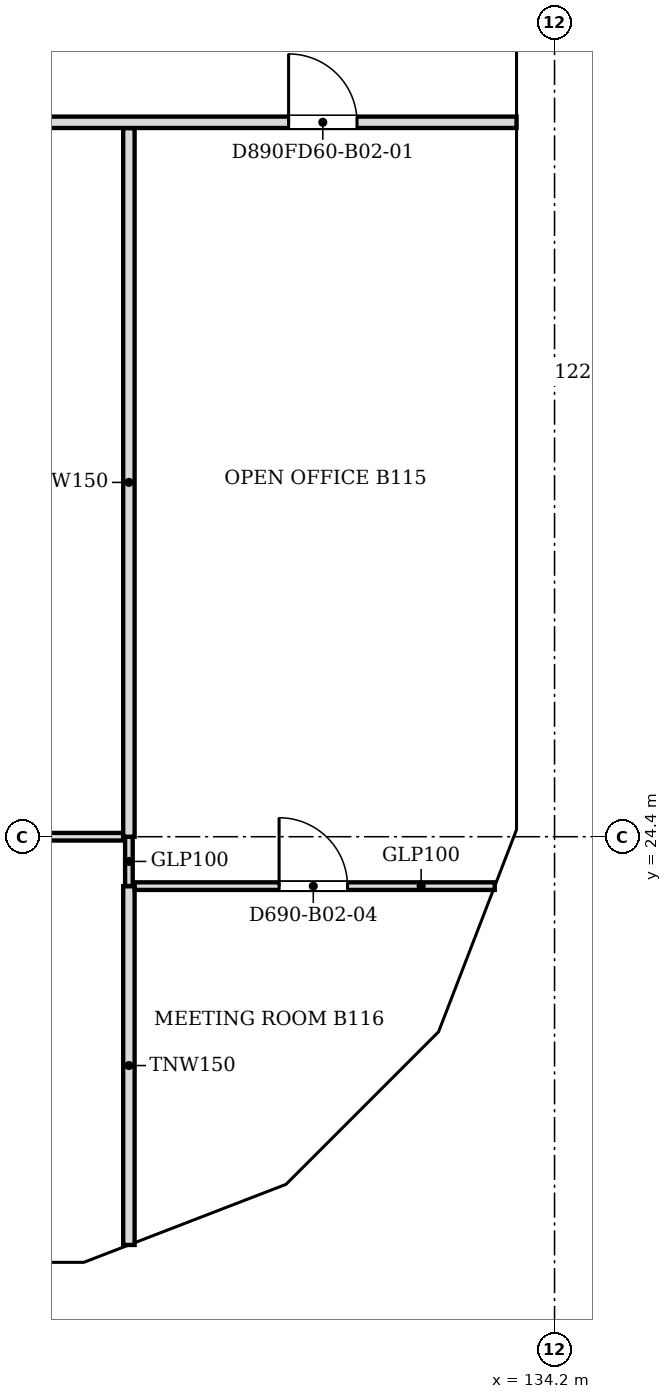
"""IFC4 building model, lengths in metres.
Left out: names, types, materials, properties, quantities, classifications, styles, units other than length and angle.
Written with IfcOpenShell. Run it as: python <this file> out.ifc"""

import sys

from ifc_helpers import new_model, si_unit, direction, frame, frame_2d, origin, place, context, subcontext, project, spatial, polyline, rectangle, outline, extrude, faceted_brep, source, transform, mapped, element, fill, save


model = new_model("IFC4")
c1 = context("Model", 3, precision=1e-05, world=origin(), true_north=direction((0.0, 1.0)))
c2 = subcontext(c1, "Body", "Model", "MODEL_VIEW")
j1 = project(units=[si_unit("LENGTHUNIT", "METRE"), si_unit("PLANEANGLEUNIT", "RADIAN")], contexts=[c1])
p1 = place(None, origin())
s1 = spatial("IfcSite", under=j1, at=p1, CompositionType="ELEMENT")
p2 = place(p1, origin())
s2 = spatial("IfcBuilding", under=s1, at=p2, CompositionType="ELEMENT")
p3 = place(p2, frame((0.0, 0.0, 21.3)))
s3 = spatial("IfcBuildingStorey", under=s2, at=p3, CompositionType="ELEMENT", Elevation=21.3)
m1 = source(origin(), c2, "Body", "Brep", [
    faceted_brep([(3.05, -0.25, 0.0), (6.053, -0.25, 4.5), (3.05, -0.25, 9.0), (0.0, -0.25, 4.5), (0.0, 0.25, 4.5), (3.05, 0.25, 9.0), (6.007, 0.25, 4.57), (6.007, 0.25, 4.43), (3.05, 0.25, 0.0), (6.053, 0.0, 4.5)], [[[0, 1, 2, 3]], [[4, 5, 6, 7, 8]], [[8, 7, 9, 1, 0]], [[6, 5, 2, 1, 9]], [[5, 4, 3, 2]], [[4, 8, 0, 3]], [[9, 7, 6]]]),
])
p4 = place(p3, frame((122.0, 18.55, -4.5), z_axis=(0.0, 0.0, 1.0), x_axis=(1.0, 0.0, 0.0)))
e1 = element("IfcWall", 1, at=p4, inside=s3, PredefinedType="SOLIDWALL", context=c2, shape_type="MappedRepresentation", body=[
    mapped(m1, transform((0.0, 0.0, 0.0), scale=1.0)),
])
m2 = source(origin(), c2, "Body", "SweptSolid", [
    extrude(outline(polyline([(3.048, 0.448), (5.753, 4.5), (3.048, 8.552), (0.302, 4.5), (3.048, 0.448)])), frame((0.0, 0.26, 0.0), z_axis=(0.0, -1.0, 0.0), x_axis=(1.0, 0.0, 0.0)), (0.0, 0.0, 1.0), 0.52),
])
p5 = place(p4, origin())
e2 = element("IfcOpeningElement", 2, at=p5, cuts=e1, PredefinedType="OPENING", context=c2, shape_type="MappedRepresentation", body=[
    mapped(m2, transform((0.0, 0.0, 0.0), scale=1.0)),
])
m3 = source(origin(), c2, "Body", "Brep", [
    faceted_brep([(2.95, -0.25, 0.0), (3.003, -0.25, 0.081), (3.003, -0.25, 8.919), (2.95, -0.25, 9.0), (0.0, -0.25, 4.5), (0.047, 0.25, 4.571), (2.898, 0.25, 8.919), (2.898, 0.25, 0.081), (0.047, 0.25, 4.429), (2.95, 0.0, 0.0), (2.95, 0.0, 9.0), (0.0, 0.0, 4.5)], [[[0, 1, 2, 3, 4]], [[5, 6, 7, 8]], [[1, 0, 9]], [[10, 3, 2]], [[6, 5, 11, 4, 3, 10]], [[8, 7, 9, 0, 4, 11]], [[8, 11, 5]], [[1, 9, 7, 6, 10, 2]]]),
])
p6 = place(p3, frame((128.053, 18.55, -4.5), z_axis=(0.0, 0.0, 1.0), x_axis=(0.933007896601, 0.359855894603, 0.0)))
e3 = element("IfcWall", 3, at=p6, inside=s3, PredefinedType="SOLIDWALL", context=c2, shape_type="MappedRepresentation", body=[
    mapped(m3, transform((0.0, 0.0, 0.0), scale=1.0)),
])
m4 = source(origin(), c2, "Body", "SweptSolid", [
    extrude(outline(polyline([(2.75, 8.239), (0.299, 4.5), (2.75, 0.761), (2.75, 8.239)])), frame((0.0, 0.26, 0.0), z_axis=(0.0, -1.0, 0.0), x_axis=(1.0, 0.0, 0.0)), (0.0, 0.0, 1.0), 0.52),
])
p7 = place(p6, origin())
e4 = element("IfcOpeningElement", 4, at=p7, cuts=e3, PredefinedType="OPENING", context=c2, shape_type="MappedRepresentation", body=[
    mapped(m4, transform((0.0, 0.0, 0.0), scale=1.0)),
])
m5 = source(origin(), c2, "Body", "Brep", [
    faceted_brep([(0.053, -0.25, 0.0), (2.997, -0.25, 4.5), (0.053, -0.25, 9.0), (0.0, -0.25, 8.919), (0.0, -0.25, 0.081), (0.106, 0.25, 8.919), (2.944, 0.25, 4.581), (2.944, 0.25, 4.419), (0.106, 0.25, 0.081), (2.997, 0.0, 4.5), (0.053, 0.0, 0.0), (0.053, 0.0, 9.0)], [[[0, 1, 2, 3, 4]], [[5, 6, 7, 8]], [[8, 7, 9, 1, 0, 10]], [[6, 5, 11, 2, 1, 9]], [[3, 2, 11]], [[10, 0, 4]], [[8, 10, 4, 3, 11, 5]], [[9, 7, 6]]]),
])
p8 = place(p3, frame((130.769, 19.574, -4.5), z_axis=(0.0, 0.0, 1.0), x_axis=(0.707106781187, 0.707106781187, 0.0)))
e5 = element("IfcWall", 5, at=p8, inside=s3, PredefinedType="SOLIDWALL", context=c2, shape_type="MappedRepresentation", body=[
    mapped(m5, transform((0.0, 0.0, 0.0), scale=1.0)),
])
m6 = source(origin(), c2, "Body", "SweptSolid", [
    extrude(outline(polyline([(0.253, 0.762), (2.698, 4.5), (0.253, 8.238), (0.253, 0.762)])), frame((0.0, 0.26, 0.0), z_axis=(0.0, -1.0, 0.0), x_axis=(1.0, 0.0, 0.0)), (0.0, 0.0, 1.0), 0.52),
])
p9 = place(p8, origin())
e6 = element("IfcOpeningElement", 6, at=p9, cuts=e5, PredefinedType="OPENING", context=c2, shape_type="MappedRepresentation", body=[
    mapped(m6, transform((0.0, 0.0, 0.0), scale=1.0)),
])
m7 = source(origin(), c2, "Body", "Brep", [
    faceted_brep([(2.95, -0.25, 0.0), (2.997, -0.25, 0.07), (2.997, -0.25, 8.93), (2.95, -0.25, 9.0), (0.0, -0.25, 4.5), (0.053, 0.25, 4.581), (2.904, 0.25, 8.929), (2.904, 0.25, 0.071), (0.053, 0.25, 4.419), (2.95, 0.0, 0.0), (2.95, 0.0, 9.0), (0.0, 0.0, 4.5)], [[[0, 1, 2, 3, 4]], [[5, 6, 7, 8]], [[1, 0, 9]], [[10, 3, 2]], [[6, 5, 11, 4, 3, 10]], [[8, 7, 9, 0, 4, 11]], [[8, 11, 5]], [[1, 9, 7, 6, 10, 2]]]),
])
p10 = place(p3, frame((132.888, 21.694, -4.5), z_axis=(0.0, 0.0, 1.0), x_axis=(0.359901446078, 0.932990326376, 0.0)))
e7 = element("IfcWall", 7, at=p10, inside=s3, PredefinedType="SOLIDWALL", context=c2, shape_type="MappedRepresentation", body=[
    mapped(m7, transform((0.0, 0.0, 0.0), scale=1.0)),
])
p11 = place(p10, origin())
e8 = element("IfcOpeningElement", 8, at=p11, cuts=e7, PredefinedType="OPENING", context=c2, shape_type="MappedRepresentation", body=[
    mapped(m4, transform((0.0, 0.0, 0.0), scale=1.0)),
])
m8 = source(origin(), c2, "Body", "Brep", [
    faceted_brep([(0.047, -0.25, 0.0), (3.05, -0.25, 4.5), (0.047, -0.25, 9.0), (0.0, -0.25, 8.929), (0.0, -0.25, 0.071), (0.093, 0.25, 8.93), (3.05, 0.25, 4.5), (0.093, 0.25, 0.07), (0.047, 0.0, 0.0), (0.047, 0.0, 9.0)], [[[0, 1, 2, 3, 4]], [[5, 6, 7]], [[7, 6, 1, 0, 8]], [[6, 5, 9, 2, 1]], [[3, 2, 9]], [[8, 0, 4]], [[7, 8, 4, 3, 9, 5]]]),
])
p12 = place(p3, frame((133.95, 24.4, -4.5), z_axis=(0.0, 0.0, 1.0), x_axis=(0.0, 1.0, 0.0)))
e9 = element("IfcWall", 9, at=p12, inside=s3, PredefinedType="SOLIDWALL", context=c2, shape_type="MappedRepresentation", body=[
    mapped(m8, transform((0.0, 0.0, 0.0), scale=1.0)),
])
m9 = source(origin(), c2, "Body", "SweptSolid", [
    extrude(outline(polyline([(0.247, 0.75), (2.75, 4.5), (0.247, 8.25), (0.247, 0.75)])), frame((0.0, 0.26, 0.0), z_axis=(0.0, -1.0, 0.0), x_axis=(1.0, 0.0, 0.0)), (0.0, 0.0, 1.0), 0.52),
])
p13 = place(p12, origin())
e10 = element("IfcOpeningElement", 10, at=p13, cuts=e9, PredefinedType="OPENING", context=c2, shape_type="MappedRepresentation", body=[
    mapped(m9, transform((0.0, 0.0, 0.0), scale=1.0)),
])
m10 = source(origin(), c2, "Body", "SweptSolid", [
    extrude(outline(polyline([(3.05, 0.0), (6.1, 4.5), (3.05, 9.0), (0.0, 4.5), (3.05, 0.0)])), frame((0.0, 0.25, 0.0), z_axis=(0.0, -1.0, 0.0), x_axis=(1.0, 0.0, 0.0)), (0.0, 0.0, 1.0), 0.5),
])
p14 = place(p3, frame((133.95, 27.45, -4.5), z_axis=(0.0, 0.0, 1.0), x_axis=(0.0, 1.0, 0.0)))
e11 = element("IfcWall", 11, at=p14, inside=s3, PredefinedType="SOLIDWALL", context=c2, shape_type="MappedRepresentation", body=[
    mapped(m10, transform((0.0, 0.0, 0.0), scale=1.0)),
])
m11 = source(origin(), c2, "Body", "SweptSolid", [
    extrude(outline(polyline([(3.05, 0.446), (5.798, 4.5), (3.05, 8.554), (0.302, 4.5), (3.05, 0.446)])), frame((0.0, 0.26, 0.0), z_axis=(0.0, -1.0, 0.0), x_axis=(1.0, 0.0, 0.0)), (0.0, 0.0, 1.0), 0.52),
])
p15 = place(p14, origin())
e12 = element("IfcOpeningElement", 12, at=p15, cuts=e11, PredefinedType="OPENING", context=c2, shape_type="MappedRepresentation", body=[
    mapped(m11, transform((0.0, 0.0, 0.0), scale=1.0)),
])
m12 = source(origin(), c2, "Body", "Brep", [
    faceted_brep([(3.05, -0.25, 0.0), (6.1, -0.25, 4.5), (6.1, -0.25, 4.5), (3.05, -0.25, 9.0), (0.0, -0.25, 4.5), (0.0, 0.25, 4.5), (3.05, 0.25, 9.0), (6.1, 0.25, 4.5), (6.1, 0.25, 4.5), (3.05, 0.25, 0.0)], [[[0, 1, 2, 3, 4]], [[5, 6, 7, 8, 9]], [[9, 8, 1, 0]], [[7, 6, 3, 2]], [[6, 5, 4, 3]], [[5, 9, 0, 4]], [[1, 8, 7, 2]]]),
])
p16 = place(p3, frame((133.95, 33.55, -4.5), z_axis=(0.0, 0.0, 1.0), x_axis=(0.0, 1.0, 0.0)))
e13 = element("IfcWall", 13, at=p16, inside=s3, PredefinedType="SOLIDWALL", context=c2, shape_type="MappedRepresentation", body=[
    mapped(m12, transform((0.0, 0.0, 0.0), scale=1.0)),
])
p17 = place(p16, origin())
e14 = element("IfcOpeningElement", 14, at=p17, cuts=e13, PredefinedType="OPENING", context=c2, shape_type="MappedRepresentation", body=[
    mapped(m11, transform((0.0, 0.0, 0.0), scale=1.0)),
])
m13 = source(origin(), c2, "Body", "Brep", [
    faceted_brep([(3.003, -0.25, 0.0), (3.05, -0.25, 0.071), (3.05, -0.25, 4.5), (0.0, -0.25, 4.5), (0.0, 0.25, 4.5), (2.957, 0.25, 4.5), (2.957, 0.25, 0.07), (3.003, 0.0, 0.0)], [[[0, 1, 2, 3]], [[4, 5, 6]], [[1, 0, 7]], [[5, 4, 3, 2]], [[4, 6, 7, 0, 3]], [[1, 7, 6, 5, 2]]]),
])
p18 = place(p3, frame((125.05, 18.55, 0.0), z_axis=(0.0, 0.0, 1.0), x_axis=(1.0, 0.0, 0.0)))
e15 = element("IfcWall", 15, at=p18, inside=s3, PredefinedType="SOLIDWALL", context=c2, shape_type="MappedRepresentation", body=[
    mapped(m13, transform((0.0, 0.0, 0.0), scale=1.0)),
])
m14 = source(origin(), c2, "Body", "SweptSolid", [
    extrude(outline(polyline([(2.803, 4.25), (0.468, 4.25), (2.803, 0.75), (2.803, 4.25)])), frame((0.0, 0.26, 0.0), z_axis=(0.0, -1.0, 0.0), x_axis=(1.0, 0.0, 0.0)), (0.0, 0.0, 1.0), 0.52),
])
p19 = place(p18, origin())
e16 = element("IfcOpeningElement", 16, at=p19, cuts=e15, PredefinedType="OPENING", context=c2, shape_type="MappedRepresentation", body=[
    mapped(m14, transform((0.0, 0.0, 0.0), scale=1.0)),
])
m15 = source(origin(), c2, "Body", "Brep", [
    faceted_brep([(0.047, -0.25, 0.0), (2.997, -0.25, 4.5), (0.0, -0.25, 4.5), (0.0, -0.25, 0.07), (0.093, 0.25, 4.5), (2.944, 0.25, 4.5), (2.944, 0.25, 4.419), (0.093, 0.25, 0.071), (2.997, 0.0, 4.5), (0.047, 0.0, 0.0)], [[[0, 1, 2, 3]], [[4, 5, 6, 7]], [[7, 6, 8, 1, 0, 9]], [[5, 4, 2, 1, 8]], [[9, 0, 3]], [[7, 9, 3, 2, 4]], [[6, 5, 8]]]),
])
p20 = place(p3, frame((128.01, 18.533, 0.0), z_axis=(0.0, 0.0, 1.0), x_axis=(0.932990326376, 0.359901446078, 0.0)))
e17 = element("IfcWall", 17, at=p20, inside=s3, PredefinedType="SOLIDWALL", context=c2, shape_type="MappedRepresentation", body=[
    mapped(m15, transform((0.0, 0.0, 0.0), scale=1.0)),
])
m16 = source(origin(), c2, "Body", "SweptSolid", [
    extrude(outline(polyline([(0.247, 0.761), (2.534, 4.25), (0.247, 4.25), (0.247, 0.761)])), frame((0.0, 0.26, 0.0), z_axis=(0.0, -1.0, 0.0), x_axis=(1.0, 0.0, 0.0)), (0.0, 0.0, 1.0), 0.52),
])
p21 = place(p20, origin())
e18 = element("IfcOpeningElement", 18, at=p21, cuts=e17, PredefinedType="OPENING", context=c2, shape_type="MappedRepresentation", body=[
    mapped(m16, transform((0.0, 0.0, 0.0), scale=1.0)),
])
m17 = source(origin(), c2, "Body", "Brep", [
    faceted_brep([(2.944, -0.25, 0.0), (2.997, -0.25, 0.081), (2.997, -0.25, 4.5), (0.0, -0.25, 4.5), (0.053, 0.25, 4.5), (2.891, 0.25, 4.5), (2.891, 0.25, 0.081), (0.053, 0.25, 4.419), (2.944, 0.0, 0.0), (0.0, 0.0, 4.5)], [[[0, 1, 2, 3]], [[4, 5, 6, 7]], [[1, 0, 8]], [[5, 4, 9, 3, 2]], [[7, 6, 8, 0, 3, 9]], [[7, 9, 4]], [[1, 8, 6, 5, 2]]]),
])
p22 = place(p3, frame((130.806, 19.612, 0.0), z_axis=(0.0, 0.0, 1.0), x_axis=(0.707106781187, 0.707106781187, 0.0)))
e19 = element("IfcWall", 19, at=p22, inside=s3, PredefinedType="SOLIDWALL", context=c2, shape_type="MappedRepresentation", body=[
    mapped(m17, transform((0.0, 0.0, 0.0), scale=1.0)),
])
m18 = source(origin(), c2, "Body", "SweptSolid", [
    extrude(outline(polyline([(2.744, 4.25), (0.462, 4.25), (2.744, 0.762), (2.744, 4.25)])), frame((0.0, 0.26, 0.0), z_axis=(0.0, -1.0, 0.0), x_axis=(1.0, 0.0, 0.0)), (0.0, 0.0, 1.0), 0.52),
])
p23 = place(p22, origin())
e20 = element("IfcOpeningElement", 20, at=p23, cuts=e19, PredefinedType="OPENING", context=c2, shape_type="MappedRepresentation", body=[
    mapped(m18, transform((0.0, 0.0, 0.0), scale=1.0)),
])
m19 = source(origin(), c2, "Body", "Brep", [
    faceted_brep([(0.053, -0.25, 0.0), (3.003, -0.25, 4.5), (0.0, -0.25, 4.5), (0.0, -0.25, 0.081), (0.106, 0.25, 4.5), (2.957, 0.25, 4.5), (2.957, 0.25, 4.429), (0.106, 0.25, 0.081), (3.003, 0.0, 4.5), (0.053, 0.0, 0.0)], [[[0, 1, 2, 3]], [[4, 5, 6, 7]], [[7, 6, 8, 1, 0, 9]], [[5, 4, 2, 1, 8]], [[9, 0, 3]], [[7, 9, 3, 2, 4]], [[6, 5, 8]]]),
])
p24 = place(p3, frame((132.869, 21.644, 0.0), z_axis=(0.0, 0.0, 1.0), x_axis=(0.359855894603, 0.933007896601, 0.0)))
e21 = element("IfcWall", 21, at=p24, inside=s3, PredefinedType="SOLIDWALL", context=c2, shape_type="MappedRepresentation", body=[
    mapped(m19, transform((0.0, 0.0, 0.0), scale=1.0)),
])
m20 = source(origin(), c2, "Body", "SweptSolid", [
    extrude(outline(polyline([(0.253, 0.761), (2.541, 4.25), (0.253, 4.25), (0.253, 0.761)])), frame((0.0, 0.26, 0.0), z_axis=(0.0, -1.0, 0.0), x_axis=(1.0, 0.0, 0.0)), (0.0, 0.0, 1.0), 0.52),
])
p25 = place(p24, origin())
e22 = element("IfcOpeningElement", 22, at=p25, cuts=e21, PredefinedType="OPENING", context=c2, shape_type="MappedRepresentation", body=[
    mapped(m20, transform((0.0, 0.0, 0.0), scale=1.0)),
])
m21 = source(origin(), c2, "Body", "Brep", [
    faceted_brep([(3.003, -0.25, 0.0), (6.053, -0.25, 4.5), (0.0, -0.25, 4.5), (0.047, 0.25, 4.5), (6.053, 0.25, 4.5), (3.003, 0.25, 0.0), (0.047, 0.25, 4.43), (0.0, 0.0, 4.5)], [[[0, 1, 2]], [[3, 4, 5, 6]], [[5, 4, 1, 0]], [[4, 3, 7, 2, 1]], [[6, 5, 0, 2, 7]], [[6, 7, 3]]]),
])
p26 = place(p3, frame((133.95, 24.447, 0.0), z_axis=(0.0, 0.0, 1.0), x_axis=(0.0, 1.0, 0.0)))
e23 = element("IfcWall", 23, at=p26, inside=s3, PredefinedType="SOLIDWALL", context=c2, shape_type="MappedRepresentation", body=[
    mapped(m21, transform((0.0, 0.0, 0.0), scale=1.0)),
])
m22 = source(origin(), c2, "Body", "SweptSolid", [
    extrude(outline(polyline([(3.005, 0.448), (5.582, 4.25), (0.468, 4.25), (3.005, 0.448)])), frame((0.0, 0.26, 0.0), z_axis=(0.0, -1.0, 0.0), x_axis=(1.0, 0.0, 0.0)), (0.0, 0.0, 1.0), 0.52),
])
p27 = place(p26, origin())
e24 = element("IfcOpeningElement", 24, at=p27, cuts=e23, PredefinedType="OPENING", context=c2, shape_type="MappedRepresentation", body=[
    mapped(m22, transform((0.0, 0.0, 0.0), scale=1.0)),
])
m23 = source(origin(), c2, "Body", "SweptSolid", [
    extrude(outline(polyline([(3.05, 0.0), (6.1, 4.5), (0.0, 4.5), (3.05, 0.0)])), frame((0.0, 0.25, 0.0), z_axis=(0.0, -1.0, 0.0), x_axis=(1.0, 0.0, 0.0)), (0.0, 0.0, 1.0), 0.5),
])
p28 = place(p3, frame((133.95, 30.5, 0.0), z_axis=(0.0, 0.0, 1.0), x_axis=(0.0, 1.0, 0.0)))
e25 = element("IfcWall", 25, at=p28, inside=s3, PredefinedType="SOLIDWALL", context=c2, shape_type="MappedRepresentation", body=[
    mapped(m23, transform((0.0, 0.0, 0.0), scale=1.0)),
])
m24 = source(origin(), c2, "Body", "SweptSolid", [
    extrude(outline(polyline([(3.05, 0.446), (5.629, 4.25), (0.471, 4.25), (3.05, 0.446)])), frame((0.0, 0.26, 0.0), z_axis=(0.0, -1.0, 0.0), x_axis=(1.0, 0.0, 0.0)), (0.0, 0.0, 1.0), 0.52),
])
p29 = place(p28, origin())
e26 = element("IfcOpeningElement", 26, at=p29, cuts=e25, PredefinedType="OPENING", context=c2, shape_type="MappedRepresentation", body=[
    mapped(m24, transform((0.0, 0.0, 0.0), scale=1.0)),
])
p30 = place(p3, frame((128.6, 19.029, 0.0), z_axis=(0.0, 0.0, 1.0), x_axis=(0.0, 1.0, 0.0)))
e27 = element("IfcWall", 27, at=p30, inside=s3, PredefinedType="PARTITIONING", context=c2, shape_type="SweptSolid", body=[
    extrude(rectangle(XDim=4.721, YDim=0.15, at=frame_2d((2.361, 0.0))), origin(), (0.0, 0.0, 1.0), 3.767),
])
p31 = place(p3, frame((128.6, 23.751, 0.0), z_axis=(0.0, 0.0, 1.0), x_axis=(0.0, 1.0, 0.0)))
e28 = element("IfcWall", 28, at=p31, inside=s3, PredefinedType="PARTITIONING", context=c2, shape_type="SweptSolid", body=[
    extrude(rectangle(XDim=0.648, YDim=0.1, at=frame_2d((0.324, 0.0))), origin(), (0.0, 0.0, 1.0), 3.767),
])
p32 = place(p3, frame((133.413, 23.75, 0.0), z_axis=(0.0, 0.0, 1.0), x_axis=(-1.0, 0.0, 0.0)))
e29 = element("IfcWall", 29, at=p32, inside=s3, PredefinedType="PARTITIONING", context=c2, shape_type="SweptSolid", body=[
    extrude(rectangle(XDim=4.737, YDim=0.1, at=frame_2d((2.369, 0.0))), origin(), (0.0, 0.0, 1.0), 3.767),
])
m25 = source(origin(), c2, "Body", "SweptSolid", [
    extrude(rectangle(XDim=0.9, YDim=2.1, at=frame_2d((0.45, 1.05))), frame((0.0, 0.06, 0.0), z_axis=(0.0, -1.0, 0.0), x_axis=(1.0, 0.0, 0.0)), (0.0, 0.0, 1.0), 0.12),
])
p33 = place(p32, frame((1.937, 0.0, 0.0)))
e30 = element("IfcOpeningElement", 30, at=p33, cuts=e29, PredefinedType="OPENING", context=c2, shape_type="MappedRepresentation", body=[
    mapped(m25, transform((0.0, 0.0, 0.0), scale=1.0)),
])
p34 = place(p3, frame((128.524, 24.4, 0.0), z_axis=(0.0, 0.0, 1.0), x_axis=(-1.0, 0.0, 0.0)))
e31 = element("IfcWall", 31, at=p34, inside=s3, PredefinedType="PARTITIONING", context=c2, shape_type="SweptSolid", body=[
    extrude(rectangle(XDim=6.073, YDim=0.1, at=frame_2d((3.037, 0.0))), origin(), (0.0, 0.0, 1.0), 3.767),
])
p35 = place(p34, frame((2.573, 0.0, 0.0)))
e32 = element("IfcOpeningElement", 32, at=p35, cuts=e31, PredefinedType="OPENING", context=c2, shape_type="MappedRepresentation", body=[
    mapped(m25, transform((0.0, 0.0, 0.0), scale=1.0)),
])
p36 = place(p3, frame((128.6, 24.4, 0.0), z_axis=(0.0, 0.0, 1.0), x_axis=(0.0, 1.0, 0.0)))
e33 = element("IfcWall", 33, at=p36, inside=s3, PredefinedType="PARTITIONING", context=c2, shape_type="SweptSolid", body=[
    extrude(rectangle(XDim=9.324, YDim=0.15, at=frame_2d((4.662, 0.0))), origin(), (0.0, 0.0, 1.0), 3.767),
])
p37 = place(p3, frame((133.7, 33.8, 0.0), z_axis=(0.0, 0.0, 1.0), x_axis=(-1.0, 0.0, 0.0)))
e34 = element("IfcWall", 34, at=p37, inside=s3, PredefinedType="PARTITIONING", context=c2, shape_type="SweptSolid", body=[
    extrude(rectangle(XDim=47.8, YDim=0.15, at=frame_2d((23.9, 0.0))), origin(), (0.0, 0.0, 1.0), 3.767),
])
m26 = source(origin(), c2, "Body", "SweptSolid", [
    extrude(rectangle(XDim=0.9, YDim=2.1, at=frame_2d((0.45, 1.05))), frame((0.0, 0.085, 0.0), z_axis=(0.0, -1.0, 0.0), x_axis=(1.0, 0.0, 0.0)), (0.0, 0.0, 1.0), 0.17),
])
p38 = place(p37, frame((2.099, 0.0, 0.0)))
e35 = element("IfcOpeningElement", 35, at=p38, cuts=e34, PredefinedType="OPENING", context=c2, shape_type="MappedRepresentation", body=[
    mapped(m26, transform((0.0, 0.0, 0.0), scale=1.0)),
])
p39 = place(p37, frame((14.099, 0.0, 0.0)))
e36 = element("IfcOpeningElement", 36, at=p39, cuts=e34, PredefinedType="OPENING", context=c2, shape_type="MappedRepresentation", body=[
    mapped(m26, transform((0.0, 0.0, 0.0), scale=1.0)),
])
p40 = place(p37, frame((8.0, 0.0, 0.0)))
e37 = element("IfcOpeningElement", 37, at=p40, cuts=e34, PredefinedType="OPENING", context=c2, shape_type="MappedRepresentation", body=[
    mapped(m26, transform((0.0, 0.0, 0.0), scale=1.0)),
])
p41 = place(p37, frame((21.449, 0.0, 0.0)))
e38 = element("IfcOpeningElement", 38, at=p41, cuts=e34, PredefinedType="OPENING", context=c2, shape_type="MappedRepresentation", body=[
    mapped(m26, transform((0.0, 0.0, 0.0), scale=1.0)),
])
p42 = place(p37, frame((30.799, 0.0, 0.0)))
e39 = element("IfcOpeningElement", 39, at=p42, cuts=e34, PredefinedType="OPENING", context=c2, shape_type="MappedRepresentation", body=[
    mapped(m26, transform((0.0, 0.0, 0.0), scale=1.0)),
])
p43 = place(p37, frame((41.5, 0.0, 0.0)))
e40 = element("IfcOpeningElement", 40, at=p43, cuts=e34, PredefinedType="OPENING", context=c2, shape_type="MappedRepresentation", body=[
    mapped(m26, transform((0.0, 0.0, 0.0), scale=1.0)),
])
m27 = source(origin(), c2, "Body", "SweptSolid", [
    extrude(rectangle(XDim=0.9, YDim=2.1, at=frame_2d((0.45, 1.05))), frame((0.0, 0.025, 0.0), z_axis=(0.0, -1.0, 0.0), x_axis=(1.0, 0.0, 0.0)), (0.0, 0.0, 1.0), 0.05),
])
p44 = place(p33, origin())
e41 = element("IfcDoor", 41, at=p44, inside=s3, OperationType="SINGLE_SWING_RIGHT", PredefinedType="DOOR", context=c2, shape_type="MappedRepresentation", body=[
    mapped(m27, transform((0.0, 0.0, 0.0), scale=1.0)),
])
fill(e30, e41)
p45 = place(p38, origin())
e42 = element("IfcDoor", 42, at=p45, inside=s3, OperationType="SINGLE_SWING_RIGHT", PredefinedType="DOOR", context=c2, shape_type="MappedRepresentation", body=[
    mapped(m27, transform((0.0, 0.0, 0.0), scale=1.0)),
])
fill(e35, e42)
save(model, sys.argv[1])
